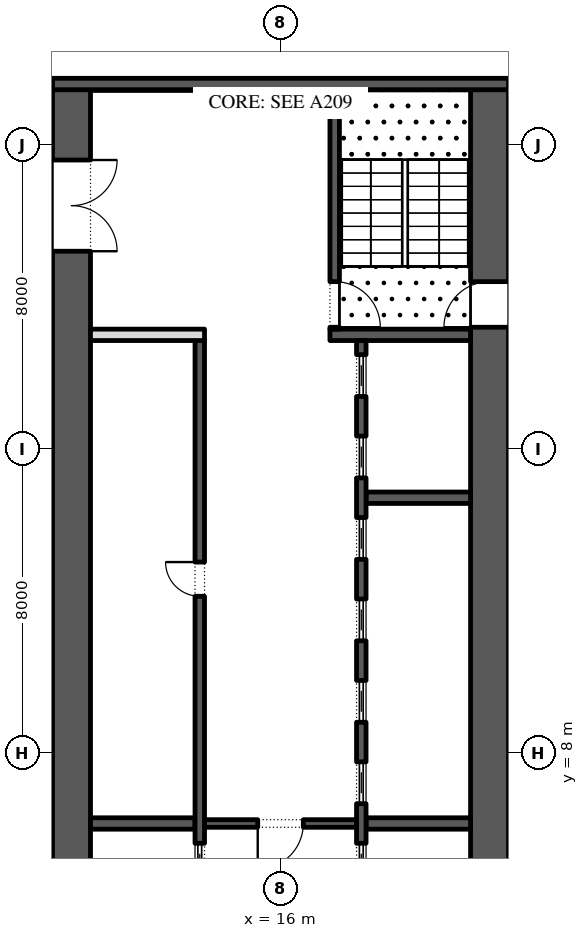
"""IFC4 building model, lengths in metres.
Left out: names, types, materials, properties, quantities, classifications, styles, units other than length and angle.
Written with IfcOpenShell. Run it as: python <this file> out.ifc"""

import sys

from ifc_helpers import new_model, si_unit, direction, frame, frame_2d, origin, place, context, subcontext, project, spatial, rectangle, extrude, element, fill, save


model = new_model("IFC4")
c1 = context("Model", 3, precision=1e-05, world=origin(), true_north=direction((0.0, 1.0)))
c2 = subcontext(c1, "Body", "Model", "MODEL_VIEW")
j1 = project(units=[si_unit("LENGTHUNIT", "METRE"), si_unit("PLANEANGLEUNIT", "RADIAN")], contexts=[c1])
p1 = place(None, origin())
s1 = spatial("IfcSite", under=j1, at=p1, CompositionType="ELEMENT")
p2 = place(p1, origin())
s2 = spatial("IfcBuilding", under=s1, at=p2, CompositionType="ELEMENT")
p3 = place(p2, frame((0.0, 0.0, 33.6)))
s3 = spatial("IfcBuildingStorey", under=s2, at=p3, CompositionType="ELEMENT", Elevation=33.6)
p4 = place(p3, frame((21.5, -2.45, 0.0), z_axis=(0.0, 0.0, 1.0), x_axis=(0.0, 1.0, 0.0)))
e1 = element("IfcWall", 1, at=p4, inside=s3, PredefinedType="SHEAR", context=c2, shape_type="SweptSolid", body=[
    extrude(rectangle(XDim=27.9, YDim=1.0, at=frame_2d((13.95, 0.0))), origin(), (0.0, 0.0, 1.0), 5.8),
])
p5 = place(p4, frame((5.05, 0.0, 0.0)))
e2 = element("IfcOpeningElement", 2, at=p5, cuts=e1, PredefinedType="OPENING", context=c2, shape_type="SweptSolid", body=[
    extrude(rectangle(XDim=1.2, YDim=2.1, at=frame_2d((0.6, 1.05))), frame((0.0, 0.51, 0.0), z_axis=(0.0, -1.0, 0.0), x_axis=(1.0, 0.0, 0.0)), (0.0, 0.0, 1.0), 1.02),
])
p6 = place(p4, frame((21.65, 0.0, 0.0)))
e3 = element("IfcOpeningElement", 3, at=p6, cuts=e1, PredefinedType="OPENING", context=c2, shape_type="SweptSolid", body=[
    extrude(rectangle(XDim=1.2, YDim=2.1, at=frame_2d((0.6, 1.05))), frame((0.0, 0.51, 0.0), z_axis=(0.0, -1.0, 0.0), x_axis=(1.0, 0.0, 0.0)), (0.0, 0.0, 1.0), 1.02),
])
p7 = place(p3, frame((10.5, -2.45, 0.0), z_axis=(0.0, 0.0, 1.0), x_axis=(0.0, 1.0, 0.0)))
e4 = element("IfcWall", 4, at=p7, inside=s3, PredefinedType="SHEAR", context=c2, shape_type="SweptSolid", body=[
    extrude(rectangle(XDim=27.9, YDim=1.0, at=frame_2d((13.95, 0.0))), origin(), (0.0, 0.0, 1.0), 5.8),
])
p8 = place(p7, frame((23.65, 0.0, 0.0)))
e5 = element("IfcOpeningElement", 5, at=p8, cuts=e4, PredefinedType="OPENING", context=c2, shape_type="SweptSolid", body=[
    extrude(rectangle(XDim=2.4, YDim=2.1, at=frame_2d((1.2, 1.05))), frame((0.0, 0.51, 0.0), z_axis=(0.0, -1.0, 0.0), x_axis=(1.0, 0.0, 0.0)), (0.0, 0.0, 1.0), 1.02),
])
p9 = place(p7, frame((1.087, 0.0, 0.0)))
e6 = element("IfcOpeningElement", 6, at=p9, cuts=e4, PredefinedType="OPENING", context=c2, shape_type="SweptSolid", body=[
    extrude(rectangle(XDim=0.9, YDim=2.1, at=frame_2d((0.45, 1.05))), frame((0.0, 0.51, 0.0), z_axis=(0.0, -1.0, 0.0), x_axis=(1.0, 0.0, 0.0)), (0.0, 0.0, 1.0), 1.02),
])
p10 = place(p7, frame((4.312, 0.0, 0.0)))
e7 = element("IfcOpeningElement", 7, at=p10, cuts=e4, PredefinedType="OPENING", context=c2, shape_type="SweptSolid", body=[
    extrude(rectangle(XDim=0.9, YDim=2.1, at=frame_2d((0.45, 1.05))), frame((0.0, 0.51, 0.0), z_axis=(0.0, -1.0, 0.0), x_axis=(1.0, 0.0, 0.0)), (0.0, 0.0, 1.0), 1.02),
])
p11 = place(p3, frame((10.0, 25.6, 0.0), z_axis=(0.0, 0.0, 1.0), x_axis=(1.0, 0.0, 0.0)))
e8 = element("IfcWall", 8, at=p11, inside=s3, PredefinedType="SHEAR", context=c2, shape_type="SweptSolid", body=[
    extrude(rectangle(XDim=12.0, YDim=0.3, at=frame_2d((6.0, 0.0))), origin(), (0.0, 0.0, 1.0), 5.8),
])
p12 = place(p3, frame((17.3, 19.0, 0.0), z_axis=(0.0, 0.0, 1.0), x_axis=(1.0, 0.0, 0.0)))
e9 = element("IfcWall", 9, at=p12, inside=s3, PredefinedType="SHEAR", context=c2, shape_type="SweptSolid", body=[
    extrude(rectangle(XDim=3.7, YDim=0.3, at=frame_2d((1.85, 0.0))), origin(), (0.0, 0.0, 1.0), 5.8),
])
p13 = place(p3, frame((17.425, 19.15, 0.0), z_axis=(0.0, 0.0, 1.0), x_axis=(0.0, 1.0, 0.0)))
e10 = element("IfcWall", 10, at=p13, inside=s3, PredefinedType="SHEAR", context=c2, shape_type="SweptSolid", body=[
    extrude(rectangle(XDim=6.3, YDim=0.25, at=frame_2d((3.15, 0.0))), origin(), (0.0, 0.0, 1.0), 5.8),
])
p14 = place(p13, frame((0.05, 0.0, 0.0)))
e11 = element("IfcOpeningElement", 11, at=p14, cuts=e10, PredefinedType="OPENING", context=c2, shape_type="SweptSolid", body=[
    extrude(rectangle(XDim=1.2, YDim=2.1, at=frame_2d((0.6, 1.05))), frame((0.0, 0.135, 0.0), z_axis=(0.0, -1.0, 0.0), x_axis=(1.0, 0.0, 0.0)), (0.0, 0.0, 1.0), 0.27),
])
for number, where, z_axis, x_axis in (
    (12, (18.25, 6.143, 0.0), (0.0, 0.0, 1.0), (1.0, 0.0, 0.0)),
    (13, (18.25, 14.714, 0.0), (0.0, 0.0, 1.0), (1.0, 0.0, 0.0)),
):
    element("IfcWall", number, at=place(p3, frame(where, z_axis=z_axis, x_axis=x_axis)), inside=s3, PredefinedType="SHEAR", context=c2, shape_type="SweptSolid", body=[
        extrude(rectangle(XDim=2.75, YDim=0.3, at=frame_2d((1.375, 0.0))), origin(), (0.0, 0.0, 1.0), 5.8),
    ])
p15 = place(p3, frame((18.125, 4.15, 0.0), z_axis=(0.0, 0.0, 1.0), x_axis=(0.0, 1.0, 0.0)))
e14 = element("IfcWall", 14, at=p15, inside=s3, PredefinedType="SHEAR", context=c2, shape_type="SweptSolid", body=[
    extrude(rectangle(XDim=14.7, YDim=0.25, at=frame_2d((7.35, 0.0))), origin(), (0.0, 0.0, 1.0), 5.8),
])
p16 = place(p15, frame((0.371, 0.0, 0.0)))
e15 = element("IfcOpeningElement", 15, at=p16, cuts=e14, PredefinedType="OPENING", context=c2, shape_type="SweptSolid", body=[
    extrude(rectangle(XDim=1.1, YDim=2.1, at=frame_2d((0.55, 1.05))), frame((0.0, 0.135, 0.0), z_axis=(0.0, -1.0, 0.0), x_axis=(1.0, 0.0, 0.0)), (0.0, 0.0, 1.0), 0.27),
])
p17 = place(p15, frame((2.514, 0.0, 0.0)))
e16 = element("IfcOpeningElement", 16, at=p17, cuts=e14, PredefinedType="OPENING", context=c2, shape_type="SweptSolid", body=[
    extrude(rectangle(XDim=1.1, YDim=2.1, at=frame_2d((0.55, 1.05))), frame((0.0, 0.135, 0.0), z_axis=(0.0, -1.0, 0.0), x_axis=(1.0, 0.0, 0.0)), (0.0, 0.0, 1.0), 0.27),
])
p18 = place(p15, frame((4.657, 0.0, 0.0)))
e17 = element("IfcOpeningElement", 17, at=p18, cuts=e14, PredefinedType="OPENING", context=c2, shape_type="SweptSolid", body=[
    extrude(rectangle(XDim=1.1, YDim=2.1, at=frame_2d((0.55, 1.05))), frame((0.0, 0.135, 0.0), z_axis=(0.0, -1.0, 0.0), x_axis=(1.0, 0.0, 0.0)), (0.0, 0.0, 1.0), 0.27),
])
p19 = place(p15, frame((6.8, 0.0, 0.0)))
e18 = element("IfcOpeningElement", 18, at=p19, cuts=e14, PredefinedType="OPENING", context=c2, shape_type="SweptSolid", body=[
    extrude(rectangle(XDim=1.1, YDim=2.1, at=frame_2d((0.55, 1.05))), frame((0.0, 0.135, 0.0), z_axis=(0.0, -1.0, 0.0), x_axis=(1.0, 0.0, 0.0)), (0.0, 0.0, 1.0), 0.27),
])
p20 = place(p15, frame((8.943, 0.0, 0.0)))
e19 = element("IfcOpeningElement", 19, at=p20, cuts=e14, PredefinedType="OPENING", context=c2, shape_type="SweptSolid", body=[
    extrude(rectangle(XDim=1.1, YDim=2.1, at=frame_2d((0.55, 1.05))), frame((0.0, 0.135, 0.0), z_axis=(0.0, -1.0, 0.0), x_axis=(1.0, 0.0, 0.0)), (0.0, 0.0, 1.0), 0.27),
])
p21 = place(p15, frame((11.086, 0.0, 0.0)))
e20 = element("IfcOpeningElement", 20, at=p21, cuts=e14, PredefinedType="OPENING", context=c2, shape_type="SweptSolid", body=[
    extrude(rectangle(XDim=1.1, YDim=2.1, at=frame_2d((0.55, 1.05))), frame((0.0, 0.135, 0.0), z_axis=(0.0, -1.0, 0.0), x_axis=(1.0, 0.0, 0.0)), (0.0, 0.0, 1.0), 0.27),
])
p22 = place(p15, frame((13.229, 0.0, 0.0)))
e21 = element("IfcOpeningElement", 21, at=p22, cuts=e14, PredefinedType="OPENING", context=c2, shape_type="SweptSolid", body=[
    extrude(rectangle(XDim=1.1, YDim=2.1, at=frame_2d((0.55, 1.05))), frame((0.0, 0.135, 0.0), z_axis=(0.0, -1.0, 0.0), x_axis=(1.0, 0.0, 0.0)), (0.0, 0.0, 1.0), 0.27),
])
p23 = place(p3, frame((11.0, 6.143, 0.0), z_axis=(0.0, 0.0, 1.0), x_axis=(1.0, 0.0, 0.0)))
e22 = element("IfcWall", 22, at=p23, inside=s3, PredefinedType="SHEAR", context=c2, shape_type="SweptSolid", body=[
    extrude(rectangle(XDim=2.75, YDim=0.3, at=frame_2d((1.375, 0.0))), origin(), (0.0, 0.0, 1.0), 5.8),
])
p24 = place(p3, frame((13.875, -2.45, 0.0), z_axis=(0.0, 0.0, 1.0), x_axis=(0.0, 1.0, 0.0)))
e23 = element("IfcWall", 23, at=p24, inside=s3, PredefinedType="SHEAR", context=c2, shape_type="SweptSolid", body=[
    extrude(rectangle(XDim=21.3, YDim=0.25, at=frame_2d((10.65, 0.0))), origin(), (0.0, 0.0, 1.0), 5.8),
])
p25 = place(p24, frame((14.571, 0.0, 0.0)))
e24 = element("IfcOpeningElement", 24, at=p25, cuts=e23, PredefinedType="OPENING", context=c2, shape_type="SweptSolid", body=[
    extrude(rectangle(XDim=0.9, YDim=2.1, at=frame_2d((0.45, 1.05))), frame((0.0, 0.135, 0.0), z_axis=(0.0, -1.0, 0.0), x_axis=(1.0, 0.0, 0.0)), (0.0, 0.0, 1.0), 0.27),
])
p26 = place(p24, frame((6.971, 0.0, 0.0)))
e25 = element("IfcOpeningElement", 25, at=p26, cuts=e23, PredefinedType="OPENING", context=c2, shape_type="SweptSolid", body=[
    extrude(rectangle(XDim=1.1, YDim=2.1, at=frame_2d((0.55, 1.05))), frame((0.0, 0.135, 0.0), z_axis=(0.0, -1.0, 0.0), x_axis=(1.0, 0.0, 0.0)), (0.0, 0.0, 1.0), 0.27),
])
p27 = place(p3, frame((11.0, 19.0, 0.0), z_axis=(0.0, 0.0, 1.0), x_axis=(1.0, 0.0, 0.0)))
e26 = element("IfcWall", 26, at=p27, inside=s3, PredefinedType="PARTITIONING", context=c2, shape_type="SweptSolid", body=[
    extrude(rectangle(XDim=3.0, YDim=0.3, at=frame_2d((1.5, 0.0))), origin(), (0.0, 0.0, 1.0), 5.8),
])
p28 = place(p3, frame((14.0, 6.143, 0.0), z_axis=(0.0, 0.0, 1.0), x_axis=(1.0, 0.0, 0.0)))
e27 = element("IfcWall", 27, at=p28, inside=s3, PredefinedType="SHEAR", context=c2, shape_type="SweptSolid", body=[
    extrude(rectangle(XDim=4.0, YDim=0.2, at=frame_2d((2.0, 0.0))), origin(), (0.0, 0.0, 1.0), 5.8),
])
p29 = place(p28, frame((1.4, 0.0, 0.0)))
e28 = element("IfcOpeningElement", 28, at=p29, cuts=e27, PredefinedType="OPENING", context=c2, shape_type="SweptSolid", body=[
    extrude(rectangle(XDim=1.2, YDim=2.1, at=frame_2d((0.6, 1.05))), frame((0.0, 0.11, 0.0), z_axis=(0.0, -1.0, 0.0), x_axis=(1.0, 0.0, 0.0)), (0.0, 0.0, 1.0), 0.22),
])
p30 = place(p16, origin())
e29 = element("IfcDoor", 29, at=p30, inside=s3, OperationType="SLIDING_TO_LEFT", PredefinedType="DOOR", context=c2, shape_type="SweptSolid", body=[
    extrude(rectangle(XDim=1.1, YDim=2.1, at=frame_2d((0.55, 1.05))), frame((0.0, 0.025, 0.0), z_axis=(0.0, -1.0, 0.0), x_axis=(1.0, 0.0, 0.0)), (0.0, 0.0, 1.0), 0.05),
])
fill(e15, e29)
p31 = place(p17, origin())
e30 = element("IfcDoor", 30, at=p31, inside=s3, OperationType="SLIDING_TO_LEFT", PredefinedType="DOOR", context=c2, shape_type="SweptSolid", body=[
    extrude(rectangle(XDim=1.1, YDim=2.1, at=frame_2d((0.55, 1.05))), frame((0.0, 0.025, 0.0), z_axis=(0.0, -1.0, 0.0), x_axis=(1.0, 0.0, 0.0)), (0.0, 0.0, 1.0), 0.05),
])
fill(e16, e30)
p32 = place(p18, origin())
e31 = element("IfcDoor", 31, at=p32, inside=s3, OperationType="SLIDING_TO_LEFT", PredefinedType="DOOR", context=c2, shape_type="SweptSolid", body=[
    extrude(rectangle(XDim=1.1, YDim=2.1, at=frame_2d((0.55, 1.05))), frame((0.0, 0.025, 0.0), z_axis=(0.0, -1.0, 0.0), x_axis=(1.0, 0.0, 0.0)), (0.0, 0.0, 1.0), 0.05),
])
fill(e17, e31)
p33 = place(p19, origin())
e32 = element("IfcDoor", 32, at=p33, inside=s3, OperationType="SLIDING_TO_LEFT", PredefinedType="DOOR", context=c2, shape_type="SweptSolid", body=[
    extrude(rectangle(XDim=1.1, YDim=2.1, at=frame_2d((0.55, 1.05))), frame((0.0, 0.025, 0.0), z_axis=(0.0, -1.0, 0.0), x_axis=(1.0, 0.0, 0.0)), (0.0, 0.0, 1.0), 0.05),
])
fill(e18, e32)
p34 = place(p20, origin())
e33 = element("IfcDoor", 33, at=p34, inside=s3, OperationType="SLIDING_TO_LEFT", PredefinedType="DOOR", context=c2, shape_type="SweptSolid", body=[
    extrude(rectangle(XDim=1.1, YDim=2.1, at=frame_2d((0.55, 1.05))), frame((0.0, 0.025, 0.0), z_axis=(0.0, -1.0, 0.0), x_axis=(1.0, 0.0, 0.0)), (0.0, 0.0, 1.0), 0.05),
])
fill(e19, e33)
p35 = place(p21, origin())
e34 = element("IfcDoor", 34, at=p35, inside=s3, OperationType="SLIDING_TO_LEFT", PredefinedType="DOOR", context=c2, shape_type="SweptSolid", body=[
    extrude(rectangle(XDim=1.1, YDim=2.1, at=frame_2d((0.55, 1.05))), frame((0.0, 0.025, 0.0), z_axis=(0.0, -1.0, 0.0), x_axis=(1.0, 0.0, 0.0)), (0.0, 0.0, 1.0), 0.05),
])
fill(e20, e34)
p36 = place(p22, origin())
e35 = element("IfcDoor", 35, at=p36, inside=s3, OperationType="SLIDING_TO_LEFT", PredefinedType="DOOR", context=c2, shape_type="SweptSolid", body=[
    extrude(rectangle(XDim=1.1, YDim=2.1, at=frame_2d((0.55, 1.05))), frame((0.0, 0.025, 0.0), z_axis=(0.0, -1.0, 0.0), x_axis=(1.0, 0.0, 0.0)), (0.0, 0.0, 1.0), 0.05),
])
fill(e21, e35)
p37 = place(p25, origin())
e36 = element("IfcDoor", 36, at=p37, inside=s3, OperationType="SINGLE_SWING_LEFT", PredefinedType="DOOR", context=c2, shape_type="SweptSolid", body=[
    extrude(rectangle(XDim=0.9, YDim=2.1, at=frame_2d((0.45, 1.05))), frame((0.0, 0.125, 0.0), z_axis=(0.0, -1.0, 0.0), x_axis=(1.0, 0.0, 0.0)), (0.0, 0.0, 1.0), 0.05),
])
fill(e24, e36)
p38 = place(p26, origin())
e37 = element("IfcDoor", 37, at=p38, inside=s3, OperationType="SLIDING_TO_LEFT", PredefinedType="DOOR", context=c2, shape_type="SweptSolid", body=[
    extrude(rectangle(XDim=1.1, YDim=2.1, at=frame_2d((0.55, 1.05))), frame((0.0, 0.025, 0.0), z_axis=(0.0, -1.0, 0.0), x_axis=(1.0, 0.0, 0.0)), (0.0, 0.0, 1.0), 0.05),
])
fill(e25, e37)
p39 = place(p29, frame((1.2, 0.0, 0.0), z_axis=(0.0, 0.0, 1.0), x_axis=(-1.0, 0.0, 0.0)))
e38 = element("IfcDoor", 38, at=p39, inside=s3, OperationType="SINGLE_SWING_LEFT", PredefinedType="DOOR", context=c2, shape_type="SweptSolid", body=[
    extrude(rectangle(XDim=1.2, YDim=2.1, at=frame_2d((0.6, 1.05))), frame((0.0, 0.025, 0.0), z_axis=(0.0, -1.0, 0.0), x_axis=(1.0, 0.0, 0.0)), (0.0, 0.0, 1.0), 0.05),
])
fill(e28, e38)
p40 = place(p8, frame((2.4, 0.0, 0.0), z_axis=(0.0, 0.0, 1.0), x_axis=(-1.0, 0.0, 0.0)))
e39 = element("IfcDoor", 39, at=p40, inside=s3, OperationType="DOUBLE_DOOR_SINGLE_SWING", PredefinedType="DOOR", context=c2, shape_type="SweptSolid", body=[
    extrude(rectangle(XDim=2.4, YDim=2.1, at=frame_2d((1.2, 1.05))), frame((0.0, 0.025, 0.0), z_axis=(0.0, -1.0, 0.0), x_axis=(1.0, 0.0, 0.0)), (0.0, 0.0, 1.0), 0.05),
])
fill(e5, e39)
p41 = place(p14, frame((1.2, 0.0, 0.0), z_axis=(0.0, 0.0, 1.0), x_axis=(-1.0, 0.0, 0.0)))
e40 = element("IfcDoor", 40, at=p41, inside=s3, OperationType="SINGLE_SWING_LEFT", PredefinedType="DOOR", context=c2, shape_type="SweptSolid", body=[
    extrude(rectangle(XDim=1.2, YDim=2.1, at=frame_2d((0.6, 1.05))), frame((0.0, 0.025, 0.0), z_axis=(0.0, -1.0, 0.0), x_axis=(1.0, 0.0, 0.0)), (0.0, 0.0, 1.0), 0.05),
])
fill(e11, e40)
p42 = place(p6, origin())
e41 = element("IfcDoor", 41, at=p42, inside=s3, OperationType="SINGLE_SWING_RIGHT", PredefinedType="DOOR", context=c2, shape_type="SweptSolid", body=[
    extrude(rectangle(XDim=1.2, YDim=2.1, at=frame_2d((0.6, 1.05))), frame((0.0, 0.025, 0.0), z_axis=(0.0, -1.0, 0.0), x_axis=(1.0, 0.0, 0.0)), (0.0, 0.0, 1.0), 0.05),
])
fill(e3, e41)
save(model, sys.argv[1])
